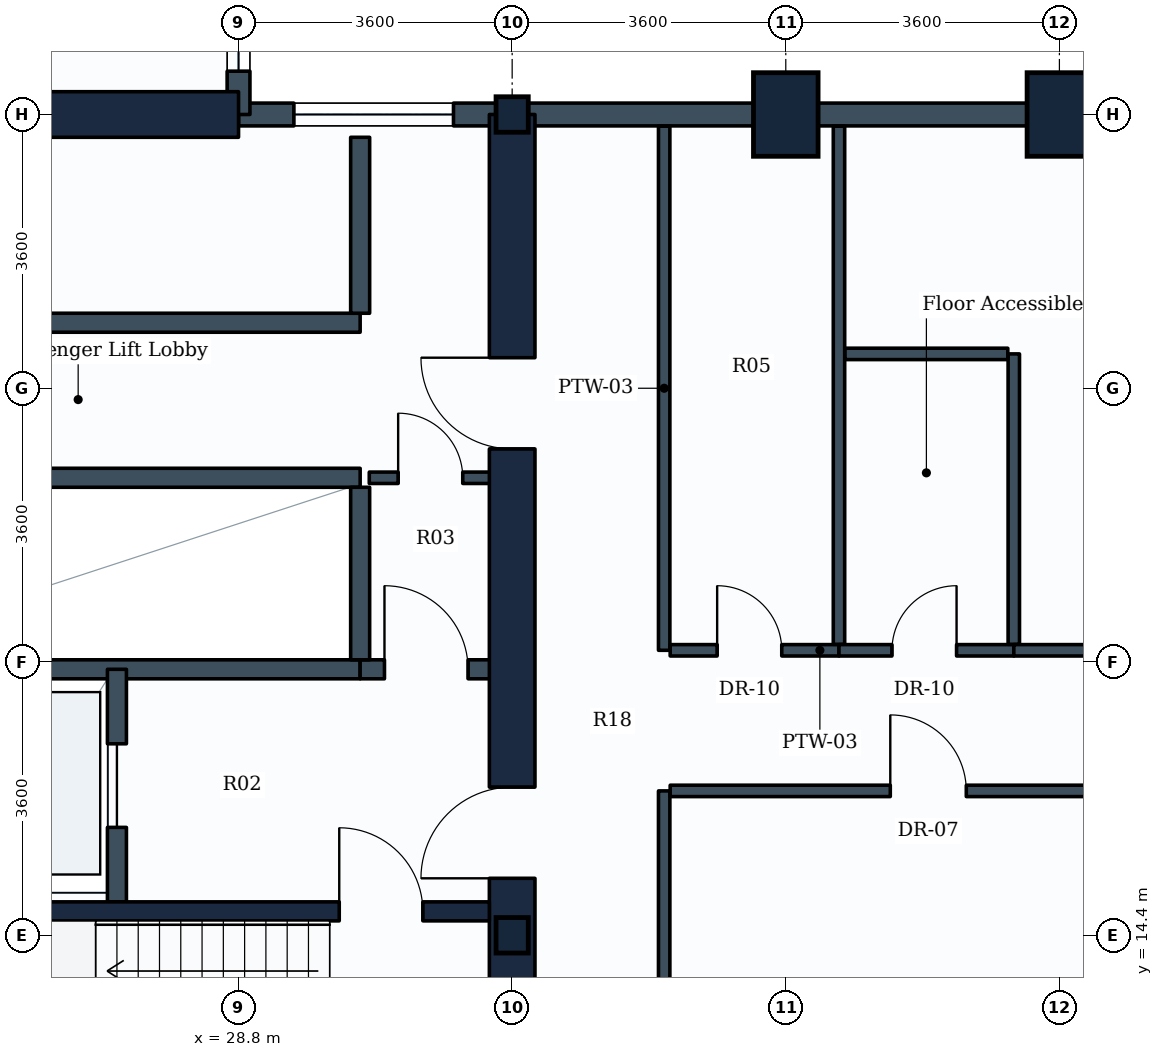
"""IFC4 building model, lengths in metres.
Left out: names, types, materials, properties, quantities, classifications, styles, units other than length and angle.
Written with IfcOpenShell. Run it as: python <this file> out.ifc"""

import sys

from ifc_helpers import new_model, si_unit, direction, frame, frame_2d, origin, origin_2d, place, context, subcontext, project, spatial, rectangle, i_section, extrude, element, fill, save


model = new_model("IFC4")
c1 = context("Model", 3, precision=1e-05, world=origin(), true_north=direction((0.0, 1.0)))
c2 = subcontext(c1, "Body", "Model", "MODEL_VIEW")
j1 = project(units=[si_unit("LENGTHUNIT", "METRE"), si_unit("PLANEANGLEUNIT", "RADIAN")], contexts=[c1])
p1 = place(None, origin())
s1 = spatial("IfcSite", under=j1, at=p1, CompositionType="ELEMENT")
p2 = place(p1, origin())
s2 = spatial("IfcBuilding", under=s1, at=p2, CompositionType="ELEMENT")
p3 = place(p2, frame((0.0, 0.0, 107.4)))
s3 = spatial("IfcBuildingStorey", under=s2, at=p3, CompositionType="ELEMENT", Elevation=107.4)
for number, where, z_axis, x_axis in (
    (1, (32.4, 14.4, 0.0), (0.0, 0.0, 1.0), (1.0, 0.0, 0.0)),
    (2, (32.4, 25.2, 0.0), (0.0, 0.0, 1.0), (1.0, 0.0, 0.0)),
):
    element("IfcColumn", number, at=place(p3, frame(where, z_axis=z_axis, x_axis=x_axis)), inside=s3, PredefinedType="COLUMN", context=c2, shape_type="SweptSolid", body=[
        extrude(i_section(OverallWidth=0.424, OverallDepth=0.467, WebThickness=0.033, FlangeThickness=0.053, FilletRadius=0.015, at=origin_2d()), origin(), (0.0, 0.0, 1.0), 3.9),
    ])
for number, where, z_axis, x_axis in (
    (3, (36.0, 25.2, 0.0), (0.0, 0.0, 1.0), (1.0, 0.0, 0.0)),
    (4, (39.6, 25.2, 0.0), (0.0, 0.0, 1.0), (1.0, 0.0, 0.0)),
):
    element("IfcColumn", number, at=place(p3, frame(where, z_axis=z_axis, x_axis=x_axis)), inside=s3, PredefinedType="COLUMN", context=c2, shape_type="SweptSolid", body=[
        extrude(rectangle(XDim=0.85, YDim=1.1, at=origin_2d()), origin(), (0.0, 0.0, 1.0), 3.9),
    ])
p4 = place(p3, frame((39.6, 25.2, 0.0), z_axis=(0.0, 0.0, 1.0), x_axis=(1.0, 0.0, 0.0)))
e5 = element("IfcWall", 5, at=p4, inside=s3, PredefinedType="STANDARD", context=c2, shape_type="SweptSolid", body=[
    extrude(rectangle(XDim=3.6, YDim=0.3, at=frame_2d((1.8, 0.0))), origin(), (0.0, 0.0, 1.0), 2.93),
])
for number, where, z_axis, x_axis in (
    (6, (36.0, 25.2, 0.0), (0.0, 0.0, 1.0), (1.0, 0.0, 0.0)),
    (7, (32.4, 25.2, 0.0), (0.0, 0.0, 1.0), (1.0, 0.0, 0.0)),
):
    element("IfcWall", number, at=place(p3, frame(where, z_axis=z_axis, x_axis=x_axis)), inside=s3, PredefinedType="STANDARD", context=c2, shape_type="SweptSolid", body=[
        extrude(rectangle(XDim=3.6, YDim=0.3, at=frame_2d((1.8, 0.0))), origin(), (0.0, 0.0, 1.0), 2.93),
    ])
p5 = place(p3, frame((28.8, 25.2, 0.0), z_axis=(0.0, 0.0, 1.0), x_axis=(1.0, 0.0, 0.0)))
e8 = element("IfcWall", 8, at=p5, inside=s3, PredefinedType="STANDARD", context=c2, shape_type="SweptSolid", body=[
    extrude(rectangle(XDim=3.6, YDim=0.3, at=frame_2d((1.8, 0.0))), origin(), (0.0, 0.0, 1.0), 3.635),
])
p6 = place(p5, frame((0.728, 0.0, 0.85)))
e9 = element("IfcOpeningElement", 9, at=p6, cuts=e8, PredefinedType="OPENING", context=c2, shape_type="SweptSolid", body=[
    extrude(rectangle(XDim=2.1, YDim=1.35, at=frame_2d((1.05, 0.675))), frame((0.0, 0.16, 0.0), z_axis=(0.0, -1.0, 0.0), x_axis=(1.0, 0.0, 0.0)), (0.0, 0.0, 1.0), 0.32),
])
p7 = place(p3, frame((28.8, 25.2, 0.0), z_axis=(0.0, 0.0, 1.0), x_axis=(0.0, 1.0, 0.0)))
e10 = element("IfcWall", 10, at=p7, inside=s3, PredefinedType="STANDARD", context=c2, shape_type="SweptSolid", body=[
    extrude(rectangle(XDim=3.6, YDim=0.3, at=frame_2d((1.8, 0.0))), origin(), (0.0, 0.0, 1.0), 3.19),
])
p8 = place(p7, frame((0.57, 0.0, 0.85)))
e11 = element("IfcOpeningElement", 11, at=p8, cuts=e10, PredefinedType="OPENING", context=c2, shape_type="SweptSolid", body=[
    extrude(rectangle(XDim=2.1, YDim=1.35, at=frame_2d((1.05, 0.675))), frame((0.0, 0.16, 0.0), z_axis=(0.0, -1.0, 0.0), x_axis=(1.0, 0.0, 0.0)), (0.0, 0.0, 1.0), 0.32),
])
p9 = place(p3, frame((14.4, 25.2, 0.0), z_axis=(0.0, 0.0, 1.0), x_axis=(1.0, 0.0, 0.0)))
e12 = element("IfcWall", 12, at=p9, inside=s3, PredefinedType="SHEAR", context=c2, shape_type="SweptSolid", body=[
    extrude(rectangle(XDim=14.4, YDim=0.6, at=frame_2d((7.2, 0.0))), origin(), (0.0, 0.0, 1.0), 3.65),
])
p10 = place(p3, frame((32.4, 10.8, 0.0), z_axis=(0.0, 0.0, 1.0), x_axis=(0.0, 1.0, 0.0)))
e13 = element("IfcWall", 13, at=p10, inside=s3, PredefinedType="SHEAR", context=c2, shape_type="SweptSolid", body=[
    extrude(rectangle(XDim=14.4, YDim=0.6, at=frame_2d((7.2, 0.0))), origin(), (0.0, 0.0, 1.0), 3.65),
])
p11 = place(p10, frame((4.35, 0.0, 0.0)))
e14 = element("IfcOpeningElement", 14, at=p11, cuts=e13, PredefinedType="OPENING", context=c2, shape_type="SweptSolid", body=[
    extrude(rectangle(XDim=1.2, YDim=2.1, at=frame_2d((0.6, 1.05))), frame((0.0, 0.31, 0.0), z_axis=(0.0, -1.0, 0.0), x_axis=(1.0, 0.0, 0.0)), (0.0, 0.0, 1.0), 0.62),
])
p12 = place(p10, frame((10.0, 0.0, 0.0)))
e15 = element("IfcOpeningElement", 15, at=p12, cuts=e13, PredefinedType="OPENING", context=c2, shape_type="SweptSolid", body=[
    extrude(rectangle(XDim=1.2, YDim=2.1, at=frame_2d((0.6, 1.05))), frame((0.0, 0.31, 0.0), z_axis=(0.0, -1.0, 0.0), x_axis=(1.0, 0.0, 0.0)), (0.0, 0.0, 1.0), 0.62),
])
p13 = place(p3, frame((23.35, 14.715, 0.0), z_axis=(0.0, 0.0, 1.0), x_axis=(1.0, 0.0, 0.0)))
e16 = element("IfcWall", 16, at=p13, inside=s3, PredefinedType="SHEAR", context=c2, shape_type="SweptSolid", body=[
    extrude(rectangle(XDim=8.75, YDim=0.25, at=frame_2d((4.375, 0.0))), origin(), (0.0, 0.0, 1.0), 3.65),
])
p14 = place(p13, frame((6.775, 0.0, 0.0)))
e17 = element("IfcOpeningElement", 17, at=p14, cuts=e16, PredefinedType="OPENING", context=c2, shape_type="SweptSolid", body=[
    extrude(rectangle(XDim=1.1, YDim=2.1, at=frame_2d((0.55, 1.05))), frame((0.0, 0.135, 0.0), z_axis=(0.0, -1.0, 0.0), x_axis=(1.0, 0.0, 0.0)), (0.0, 0.0, 1.0), 0.27),
])
p15 = place(p3, frame((21.88, 17.9, 0.0), z_axis=(0.0, 0.0, 1.0), x_axis=(1.0, 0.0, 0.0)))
e18 = element("IfcWall", 18, at=p15, inside=s3, PredefinedType="PARTITIONING", context=c2, shape_type="SweptSolid", body=[
    extrude(rectangle(XDim=8.52, YDim=0.25, at=frame_2d((4.26, 0.0))), origin(), (0.0, 0.0, 1.0), 3.635),
])
p16 = place(p3, frame((30.4, 17.9, 0.0), z_axis=(0.0, 0.0, 1.0), x_axis=(1.0, 0.0, 0.0)))
e19 = element("IfcWall", 19, at=p16, inside=s3, PredefinedType="PARTITIONING", context=c2, shape_type="SweptSolid", body=[
    extrude(rectangle(XDim=1.75, YDim=0.25, at=frame_2d((0.875, 0.0))), origin(), (0.0, 0.0, 1.0), 3.635),
])
p17 = place(p16, frame((0.32, 0.0, 0.0)))
e20 = element("IfcOpeningElement", 20, at=p17, cuts=e19, PredefinedType="OPENING", context=c2, shape_type="SweptSolid", body=[
    extrude(rectangle(XDim=1.1, YDim=2.1, at=frame_2d((0.55, 1.05))), frame((0.0, 0.135, 0.0), z_axis=(0.0, -1.0, 0.0), x_axis=(1.0, 0.0, 0.0)), (0.0, 0.0, 1.0), 0.27),
])
p18 = place(p3, frame((27.2, 14.84, 0.0), z_axis=(0.0, 0.0, 1.0), x_axis=(0.0, 1.0, 0.0)))
e21 = element("IfcWall", 21, at=p18, inside=s3, PredefinedType="PARTITIONING", context=c2, shape_type="SweptSolid", body=[
    extrude(rectangle(XDim=3.06, YDim=0.25, at=frame_2d((1.53, 0.0))), origin(), (0.0, 0.0, 1.0), 3.635),
])
p19 = place(p18, frame((0.98, 0.0, 0.0)))
e22 = element("IfcOpeningElement", 22, at=p19, cuts=e21, PredefinedType="OPENING", context=c2, shape_type="SweptSolid", body=[
    extrude(rectangle(XDim=1.1, YDim=2.1, at=frame_2d((0.55, 1.05))), frame((0.0, 0.135, 0.0), z_axis=(0.0, -1.0, 0.0), x_axis=(1.0, 0.0, 0.0)), (0.0, 0.0, 1.0), 0.27),
])
p20 = place(p3, frame((23.18, 20.42, 0.0), z_axis=(0.0, 0.0, 1.0), x_axis=(1.0, 0.0, 0.0)))
e23 = element("IfcWall", 23, at=p20, inside=s3, PredefinedType="PARTITIONING", context=c2, shape_type="SweptSolid", body=[
    extrude(rectangle(XDim=7.22, YDim=0.25, at=frame_2d((3.61, 0.0))), origin(), (0.0, 0.0, 1.0), 3.635),
])
p21 = place(p3, frame((30.4, 18.025, 0.0), z_axis=(0.0, 0.0, 1.0), x_axis=(0.0, 1.0, 0.0)))
e24 = element("IfcWall", 24, at=p21, inside=s3, PredefinedType="PARTITIONING", context=c2, shape_type="SweptSolid", body=[
    extrude(rectangle(XDim=2.27, YDim=0.25, at=frame_2d((1.135, 0.0))), origin(), (0.0, 0.0, 1.0), 3.635),
])
p22 = place(p3, frame((23.18, 22.46, 0.0), z_axis=(0.0, 0.0, 1.0), x_axis=(1.0, 0.0, 0.0)))
e25 = element("IfcWall", 25, at=p22, inside=s3, PredefinedType="PARTITIONING", context=c2, shape_type="SweptSolid", body=[
    extrude(rectangle(XDim=7.22, YDim=0.25, at=frame_2d((3.61, 0.0))), origin(), (0.0, 0.0, 1.0), 3.635),
])
p23 = place(p3, frame((30.4, 22.585, 0.0), z_axis=(0.0, 0.0, 1.0), x_axis=(0.0, 1.0, 0.0)))
e26 = element("IfcWall", 26, at=p23, inside=s3, PredefinedType="PARTITIONING", context=c2, shape_type="SweptSolid", body=[
    extrude(rectangle(XDim=2.315, YDim=0.25, at=frame_2d((1.157, 0.0))), origin(), (0.0, 0.0, 1.0), 3.635),
])
p24 = place(p3, frame((30.52, 20.42, 0.0), z_axis=(0.0, 0.0, 1.0), x_axis=(1.0, 0.0, 0.0)))
e27 = element("IfcWall", 27, at=p24, inside=s3, PredefinedType="PARTITIONING", context=c2, shape_type="SweptSolid", body=[
    extrude(rectangle(XDim=1.63, YDim=0.15, at=frame_2d((0.815, 0.0))), origin(), (0.0, 0.0, 1.0), 3.635),
])
p25 = place(p24, frame((0.38, 0.0, 0.0)))
e28 = element("IfcOpeningElement", 28, at=p25, cuts=e27, PredefinedType="OPENING", context=c2, shape_type="SweptSolid", body=[
    extrude(rectangle(XDim=0.85, YDim=2.1, at=frame_2d((0.425, 1.05))), frame((0.0, 0.085, 0.0), z_axis=(0.0, -1.0, 0.0), x_axis=(1.0, 0.0, 0.0)), (0.0, 0.0, 1.0), 0.17),
])
p26 = place(p3, frame((34.4, 18.15, 0.0), z_axis=(0.0, 0.0, 1.0), x_axis=(0.0, 1.0, 0.0)))
e29 = element("IfcWall", 29, at=p26, inside=s3, PredefinedType="PARTITIONING", context=c2, shape_type="SweptSolid", body=[
    extrude(rectangle(XDim=6.896, YDim=0.15, at=frame_2d((3.448, 0.0))), origin(), (0.0, 0.0, 1.0), 2.93),
])
p27 = place(p3, frame((34.479, 18.15, 0.0), z_axis=(0.0, 0.0, 1.0), x_axis=(1.0, 0.0, 0.0)))
e30 = element("IfcWall", 30, at=p27, inside=s3, PredefinedType="PARTITIONING", context=c2, shape_type="SweptSolid", body=[
    extrude(rectangle(XDim=2.221, YDim=0.15, at=frame_2d((1.11, 0.0))), origin(), (0.0, 0.0, 1.0), 3.18),
])
p28 = place(p27, frame((0.618, 0.0, 0.0)))
e31 = element("IfcOpeningElement", 31, at=p28, cuts=e30, PredefinedType="OPENING", context=c2, shape_type="SweptSolid", body=[
    extrude(rectangle(XDim=0.85, YDim=2.1, at=frame_2d((0.425, 1.05))), frame((0.0, 0.085, 0.0), z_axis=(0.0, -1.0, 0.0), x_axis=(1.0, 0.0, 0.0)), (0.0, 0.0, 1.0), 0.17),
])
p29 = place(p3, frame((36.7, 18.229, 0.0), z_axis=(0.0, 0.0, 1.0), x_axis=(0.0, 1.0, 0.0)))
e32 = element("IfcWall", 32, at=p29, inside=s3, PredefinedType="PARTITIONING", context=c2, shape_type="SweptSolid", body=[
    extrude(rectangle(XDim=6.817, YDim=0.15, at=frame_2d((3.408, 0.0))), origin(), (0.0, 0.0, 1.0), 2.93),
])
p30 = place(p3, frame((36.7, 18.15, 0.0), z_axis=(0.0, 0.0, 1.0), x_axis=(1.0, 0.0, 0.0)))
e33 = element("IfcWall", 33, at=p30, inside=s3, PredefinedType="PARTITIONING", context=c2, shape_type="SweptSolid", body=[
    extrude(rectangle(XDim=2.3, YDim=0.15, at=frame_2d((1.15, 0.0))), origin(), (0.0, 0.0, 1.0), 3.27),
])
p31 = place(p30, frame((0.697, 0.0, 0.0)))
e34 = element("IfcOpeningElement", 34, at=p31, cuts=e33, PredefinedType="OPENING", context=c2, shape_type="SweptSolid", body=[
    extrude(rectangle(XDim=0.85, YDim=2.1, at=frame_2d((0.425, 1.05))), frame((0.0, 0.085, 0.0), z_axis=(0.0, -1.0, 0.0), x_axis=(1.0, 0.0, 0.0)), (0.0, 0.0, 1.0), 0.17),
])
p32 = place(p3, frame((39.0, 18.229, 0.0), z_axis=(0.0, 0.0, 1.0), x_axis=(0.0, 1.0, 0.0)))
e35 = element("IfcWall", 35, at=p32, inside=s3, PredefinedType="PARTITIONING", context=c2, shape_type="SweptSolid", body=[
    extrude(rectangle(XDim=3.821, YDim=0.15, at=frame_2d((1.911, 0.0))), origin(), (0.0, 0.0, 1.0), 3.18),
])
p33 = place(p3, frame((36.779, 22.05, 0.0), z_axis=(0.0, 0.0, 1.0), x_axis=(1.0, 0.0, 0.0)))
e36 = element("IfcWall", 36, at=p33, inside=s3, PredefinedType="PARTITIONING", context=c2, shape_type="SweptSolid", body=[
    extrude(rectangle(XDim=2.142, YDim=0.15, at=frame_2d((1.071, 0.0))), origin(), (0.0, 0.0, 1.0), 3.635),
])
p34 = place(p3, frame((34.4, 3.754, 0.0), z_axis=(0.0, 0.0, 1.0), x_axis=(0.0, 1.0, 0.0)))
e37 = element("IfcWall", 37, at=p34, inside=s3, PredefinedType="PARTITIONING", context=c2, shape_type="SweptSolid", body=[
    extrude(rectangle(XDim=12.546, YDim=0.15, at=frame_2d((6.273, 0.0))), origin(), (0.0, 0.0, 1.0), 2.93),
])
p35 = place(p3, frame((34.479, 16.3, 0.0), z_axis=(0.0, 0.0, 1.0), x_axis=(1.0, 0.0, 0.0)))
e38 = element("IfcWall", 38, at=p35, inside=s3, PredefinedType="PARTITIONING", context=c2, shape_type="SweptSolid", body=[
    extrude(rectangle(XDim=6.792, YDim=0.15, at=frame_2d((3.396, 0.0))), origin(), (0.0, 0.0, 1.0), 3.18),
])
p36 = place(p35, frame((2.896, 0.0, 0.0)))
e39 = element("IfcOpeningElement", 39, at=p36, cuts=e38, PredefinedType="OPENING", context=c2, shape_type="SweptSolid", body=[
    extrude(rectangle(XDim=1.0, YDim=2.1, at=frame_2d((0.5, 1.05))), frame((0.0, 0.085, 0.0), z_axis=(0.0, -1.0, 0.0), x_axis=(1.0, 0.0, 0.0)), (0.0, 0.0, 1.0), 0.17),
])
p37 = place(p3, frame((39.0, 18.15, 0.0), z_axis=(0.0, 0.0, 1.0), x_axis=(1.0, 0.0, 0.0)))
e40 = element("IfcWall", 40, at=p37, inside=s3, PredefinedType="PARTITIONING", context=c2, shape_type="SweptSolid", body=[
    extrude(rectangle(XDim=7.731, YDim=0.15, at=frame_2d((3.865, 0.0))), origin(), (0.0, 0.0, 1.0), 3.18),
])
p38 = place(p37, frame((3.365, 0.0, 0.0)))
e41 = element("IfcOpeningElement", 41, at=p38, cuts=e40, PredefinedType="OPENING", context=c2, shape_type="SweptSolid", body=[
    extrude(rectangle(XDim=1.0, YDim=2.1, at=frame_2d((0.5, 1.05))), frame((0.0, 0.085, 0.0), z_axis=(0.0, -1.0, 0.0), x_axis=(1.0, 0.0, 0.0)), (0.0, 0.0, 1.0), 0.17),
])
p39 = place(p6, origin())
e42 = element("IfcWindow", 42, at=p39, inside=s3, PartitioningType="SINGLE_PANEL", PredefinedType="WINDOW", context=c2, shape_type="SweptSolid", body=[
    extrude(rectangle(XDim=2.1, YDim=1.35, at=frame_2d((1.05, 0.675))), frame((0.0, 0.03, 0.0), z_axis=(0.0, -1.0, 0.0), x_axis=(1.0, 0.0, 0.0)), (0.0, 0.0, 1.0), 0.06),
])
fill(e9, e42)
p40 = place(p8, origin())
e43 = element("IfcWindow", 43, at=p40, inside=s3, PartitioningType="SINGLE_PANEL", PredefinedType="WINDOW", context=c2, shape_type="SweptSolid", body=[
    extrude(rectangle(XDim=2.1, YDim=1.35, at=frame_2d((1.05, 0.675))), frame((0.0, 0.03, 0.0), z_axis=(0.0, -1.0, 0.0), x_axis=(1.0, 0.0, 0.0)), (0.0, 0.0, 1.0), 0.06),
])
fill(e11, e43)
p41 = place(p14, origin())
e44 = element("IfcDoor", 44, at=p41, inside=s3, OperationType="SINGLE_SWING_LEFT", PredefinedType="DOOR", context=c2, shape_type="SweptSolid", body=[
    extrude(rectangle(XDim=1.1, YDim=2.1, at=frame_2d((0.55, 1.05))), frame((0.0, 0.025, 0.0), z_axis=(0.0, -1.0, 0.0), x_axis=(1.0, 0.0, 0.0)), (0.0, 0.0, 1.0), 0.05),
])
fill(e17, e44)
p42 = place(p19, origin())
e45 = element("IfcDoor", 45, at=p42, inside=s3, OperationType="SLIDING_TO_LEFT", PredefinedType="DOOR", context=c2, shape_type="SweptSolid", body=[
    extrude(rectangle(XDim=1.1, YDim=2.1, at=frame_2d((0.55, 1.05))), frame((0.0, 0.025, 0.0), z_axis=(0.0, -1.0, 0.0), x_axis=(1.0, 0.0, 0.0)), (0.0, 0.0, 1.0), 0.05),
])
fill(e22, e45)
p43 = place(p11, origin())
e46 = element("IfcDoor", 46, at=p43, inside=s3, OperationType="SINGLE_SWING_LEFT", PredefinedType="DOOR", context=c2, shape_type="SweptSolid", body=[
    extrude(rectangle(XDim=1.2, YDim=2.1, at=frame_2d((0.6, 1.05))), frame((0.0, 0.025, 0.0), z_axis=(0.0, -1.0, 0.0), x_axis=(1.0, 0.0, 0.0)), (0.0, 0.0, 1.0), 0.05),
])
fill(e14, e46)
p44 = place(p17, origin())
e47 = element("IfcDoor", 47, at=p44, inside=s3, OperationType="SINGLE_SWING_LEFT", PredefinedType="DOOR", context=c2, shape_type="SweptSolid", body=[
    extrude(rectangle(XDim=1.1, YDim=2.1, at=frame_2d((0.55, 1.05))), frame((0.0, 0.025, 0.0), z_axis=(0.0, -1.0, 0.0), x_axis=(1.0, 0.0, 0.0)), (0.0, 0.0, 1.0), 0.05),
])
fill(e20, e47)
p45 = place(p12, origin())
e48 = element("IfcDoor", 48, at=p45, inside=s3, OperationType="SINGLE_SWING_RIGHT", PredefinedType="DOOR", context=c2, shape_type="SweptSolid", body=[
    extrude(rectangle(XDim=1.2, YDim=2.1, at=frame_2d((0.6, 1.05))), frame((0.0, 0.025, 0.0), z_axis=(0.0, -1.0, 0.0), x_axis=(1.0, 0.0, 0.0)), (0.0, 0.0, 1.0), 0.05),
])
fill(e15, e48)
p46 = place(p25, origin())
e49 = element("IfcDoor", 49, at=p46, inside=s3, OperationType="SINGLE_SWING_LEFT", PredefinedType="DOOR", context=c2, shape_type="SweptSolid", body=[
    extrude(rectangle(XDim=0.85, YDim=2.1, at=frame_2d((0.425, 1.05))), frame((0.0, 0.025, 0.0), z_axis=(0.0, -1.0, 0.0), x_axis=(1.0, 0.0, 0.0)), (0.0, 0.0, 1.0), 0.05),
])
fill(e28, e49)
p47 = place(p28, origin())
e50 = element("IfcDoor", 50, at=p47, inside=s3, OperationType="SINGLE_SWING_LEFT", PredefinedType="DOOR", context=c2, shape_type="SweptSolid", body=[
    extrude(rectangle(XDim=0.85, YDim=2.1, at=frame_2d((0.425, 1.05))), frame((0.0, 0.025, 0.0), z_axis=(0.0, -1.0, 0.0), x_axis=(1.0, 0.0, 0.0)), (0.0, 0.0, 1.0), 0.05),
])
fill(e31, e50)
p48 = place(p31, origin())
e51 = element("IfcDoor", 51, at=p48, inside=s3, OperationType="SINGLE_SWING_RIGHT", PredefinedType="DOOR", context=c2, shape_type="SweptSolid", body=[
    extrude(rectangle(XDim=0.85, YDim=2.1, at=frame_2d((0.425, 1.05))), frame((0.0, 0.025, 0.0), z_axis=(0.0, -1.0, 0.0), x_axis=(1.0, 0.0, 0.0)), (0.0, 0.0, 1.0), 0.05),
])
fill(e34, e51)
p49 = place(p36, origin())
e52 = element("IfcDoor", 52, at=p49, inside=s3, OperationType="SINGLE_SWING_LEFT", PredefinedType="DOOR", context=c2, shape_type="SweptSolid", body=[
    extrude(rectangle(XDim=1.0, YDim=2.1, at=frame_2d((0.5, 1.05))), frame((0.0, 0.025, 0.0), z_axis=(0.0, -1.0, 0.0), x_axis=(1.0, 0.0, 0.0)), (0.0, 0.0, 1.0), 0.05),
])
fill(e39, e52)
save(model, sys.argv[1])
